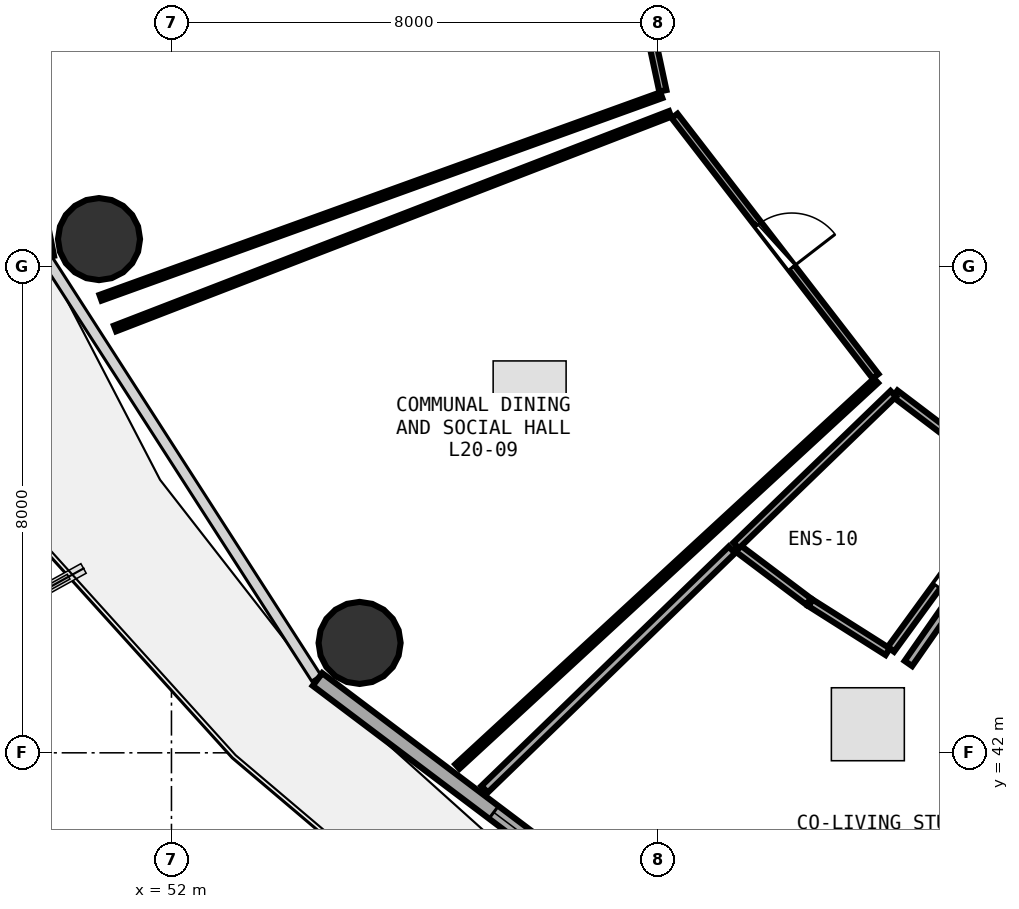
"""IFC4 building model, lengths in metres.
Left out: names, types, materials, properties, quantities, classifications, styles, units other than length and angle.
Written with IfcOpenShell. Run it as: python <this file> out.ifc"""

import sys

from ifc_helpers import new_model, si_unit, direction, frame, frame_2d, origin, origin_2d, place, context, subcontext, project, spatial, rectangle, circle, extrude, element, fill, save


model = new_model("IFC4")
c1 = context("Model", 3, precision=1e-05, world=origin(), true_north=direction((0.0, 1.0)))
c2 = subcontext(c1, "Body", "Model", "MODEL_VIEW")
j1 = project(units=[si_unit("LENGTHUNIT", "METRE"), si_unit("PLANEANGLEUNIT", "RADIAN")], contexts=[c1])
p1 = place(None, origin())
s1 = spatial("IfcSite", under=j1, at=p1, CompositionType="ELEMENT")
p2 = place(p1, origin())
s2 = spatial("IfcBuilding", under=s1, at=p2, CompositionType="ELEMENT")
p3 = place(p2, frame((0.0, 0.0, 80.1)))
s3 = spatial("IfcBuildingStorey", under=s2, at=p3, CompositionType="ELEMENT", Elevation=80.1)
for number, where, z_axis, x_axis in (
    (1, (50.808, 50.448, 0.0), (0.0, 0.0, 1.0), (1.0, 0.0, 0.0)),
    (2, (55.094, 43.807, 0.0), (0.0, 0.0, 1.0), (1.0, 0.0, 0.0)),
):
    element("IfcColumn", number, at=place(p3, frame(where, z_axis=z_axis, x_axis=x_axis)), inside=s3, PredefinedType="COLUMN", context=c2, shape_type="SweptSolid", body=[
        extrude(circle(Radius=0.675, at=origin_2d()), origin(), (0.0, 0.0, 1.0), 3.75),
    ])
p4 = place(p3, frame((48.403, 57.985, 0.0), z_axis=(0.0, 0.0, 1.0), x_axis=(0.192581843632, -0.981280914674, 0.0)))
e3 = element("IfcWall", 3, at=p4, inside=s3, PredefinedType="SOLIDWALL", context=c2, shape_type="SweptSolid", body=[
    extrude(rectangle(XDim=7.987, YDim=0.26, at=frame_2d((3.993, 0.0))), origin(), (0.0, 0.0, 1.0), 3.475),
])
p5 = place(p4, frame((3.193, 0.0, 0.85)))
e4 = element("IfcOpeningElement", 4, at=p5, cuts=e3, PredefinedType="OPENING", context=c2, shape_type="SweptSolid", body=[
    extrude(rectangle(XDim=1.6, YDim=1.45, at=frame_2d((0.8, 0.725))), frame((0.0, 0.14, 0.0), z_axis=(0.0, -1.0, 0.0), x_axis=(1.0, 0.0, 0.0)), (0.0, 0.0, 1.0), 0.28),
])
p6 = place(p3, frame((54.401, 43.207, 0.0), z_axis=(0.0, 0.0, 1.0), x_axis=(0.798501507879, -0.601992808857, 0.0)))
e5 = element("IfcWall", 5, at=p6, inside=s3, PredefinedType="SOLIDWALL", context=c2, shape_type="SweptSolid", body=[
    extrude(rectangle(XDim=8.499, YDim=0.26, at=frame_2d((4.25, 0.0))), origin(), (0.0, 0.0, 1.0), 3.475),
])
p7 = place(p6, frame((3.63, 0.0, 0.85)))
e6 = element("IfcOpeningElement", 6, at=p7, cuts=e5, PredefinedType="OPENING", context=c2, shape_type="SweptSolid", body=[
    extrude(rectangle(XDim=1.6, YDim=1.45, at=frame_2d((0.8, 0.725))), frame((0.0, 0.14, 0.0), z_axis=(0.0, -1.0, 0.0), x_axis=(1.0, 0.0, 0.0)), (0.0, 0.0, 1.0), 0.28),
])
p8 = place(p3, frame((58.983, 58.012, 0.0), z_axis=(0.0, 0.0, 1.0), x_axis=(0.209586341226, -0.977790143933, 0.0)))
e7 = element("IfcWall", 7, at=p8, inside=s3, PredefinedType="PARTITIONING", context=c2, shape_type="SweptSolid", body=[
    extrude(rectangle(XDim=5.242, YDim=0.12, at=frame_2d((2.621, 0.0))), origin(), (0.0, 0.0, 1.0), 2.925),
])
p9 = place(p8, frame((2.171, 0.0, 0.0)))
e8 = element("IfcOpeningElement", 8, at=p9, cuts=e7, PredefinedType="OPENING", context=c2, shape_type="SweptSolid", body=[
    extrude(rectangle(XDim=0.9, YDim=2.08, at=frame_2d((0.45, 1.04))), frame((0.0, 0.07, 0.0), z_axis=(0.0, -1.0, 0.0), x_axis=(1.0, 0.0, 0.0)), (0.0, 0.0, 1.0), 0.14),
])
p10 = place(p3, frame((60.275, 52.473, 0.0), z_axis=(0.0, 0.0, 1.0), x_axis=(0.611167326409, -0.791501420801, 0.0)))
e9 = element("IfcWall", 9, at=p10, inside=s3, PredefinedType="PARTITIONING", context=c2, shape_type="SweptSolid", body=[
    extrude(rectangle(XDim=5.407, YDim=0.12, at=frame_2d((2.704, 0.0))), origin(), (0.0, 0.0, 1.0), 2.925),
])
p11 = place(p10, frame((2.254, 0.0, 0.0)))
e10 = element("IfcOpeningElement", 10, at=p11, cuts=e9, PredefinedType="OPENING", context=c2, shape_type="SweptSolid", body=[
    extrude(rectangle(XDim=0.9, YDim=2.08, at=frame_2d((0.45, 1.04))), frame((0.0, 0.07, 0.0), z_axis=(0.0, -1.0, 0.0), x_axis=(1.0, 0.0, 0.0)), (0.0, 0.0, 1.0), 0.14),
])
p12 = place(p3, frame((65.855, 46.477, 0.0), z_axis=(0.0, 0.0, 1.0), x_axis=(-0.589016516568, -0.808120995402, 0.0)))
e11 = element("IfcWall", 11, at=p12, inside=s3, PredefinedType="PLUMBINGWALL", context=c2, shape_type="SweptSolid", body=[
    extrude(rectangle(XDim=3.435, YDim=0.13, at=frame_2d((1.718, 0.0))), origin(), (0.0, 0.0, 1.0), 3.175),
])
p13 = place(p12, frame((1.288, 0.0, 0.0)))
e12 = element("IfcOpeningElement", 12, at=p13, cuts=e11, PredefinedType="OPENING", context=c2, shape_type="SweptSolid", body=[
    extrude(rectangle(XDim=0.86, YDim=2.05, at=frame_2d((0.43, 1.025))), frame((0.0, 0.075, 0.0), z_axis=(0.0, -1.0, 0.0), x_axis=(1.0, 0.0, 0.0)), (0.0, 0.0, 1.0), 0.15),
])
p14 = place(p3, frame((60.056, 52.814, 0.0), z_axis=(0.0, 0.0, 1.0), x_axis=(-0.940543515483, -0.339673218671, 0.0)))
e13 = element("IfcWall", 13, at=p14, inside=s3, PredefinedType="PARTITIONING", context=c2, shape_type="SweptSolid", body=[
    extrude(rectangle(XDim=9.806, YDim=0.1, at=frame_2d((4.903, 0.0))), origin(), (0.0, 0.0, 1.0), 2.925),
])
p15 = place(p3, frame((63.587, 48.119, 0.0), z_axis=(0.0, 0.0, 1.0), x_axis=(-0.735387084409, -0.677647279995, 0.0)))
e14 = element("IfcWall", 14, at=p15, inside=s3, PredefinedType="PARTITIONING", context=c2, shape_type="SweptSolid", body=[
    extrude(rectangle(XDim=9.361, YDim=0.1, at=frame_2d((4.681, 0.0))), origin(), (0.0, 0.0, 1.0), 2.975),
])
p16 = place(p3, frame((51.072, 48.979, 0.0), z_axis=(0.0, 0.0, 1.0), x_axis=(0.932757339165, 0.360504849112, 0.0)))
e15 = element("IfcWall", 15, at=p16, inside=s3, PredefinedType="PARTITIONING", context=c2, shape_type="SweptSolid", body=[
    extrude(rectangle(XDim=9.786, YDim=0.1, at=frame_2d((4.893, 0.0))), origin(), (0.0, 0.0, 1.0), 2.925),
])
p17 = place(p3, frame((63.901, 47.907, 0.0), z_axis=(0.0, 0.0, 1.0), x_axis=(0.796629313308, -0.604468144056, 0.0)))
e16 = element("IfcWall", 16, at=p17, inside=s3, PredefinedType="PLUMBINGWALL", context=c2, shape_type="SweptSolid", body=[
    extrude(rectangle(XDim=1.178, YDim=0.13, at=frame_2d((0.589, 0.0))), origin(), (0.0, 0.0, 1.0), 2.925),
])
p18 = place(p3, frame((63.779, 43.663, 0.0), z_axis=(0.0, 0.0, 1.0), x_axis=(-0.844931806669, 0.53487404319, 0.0)))
e17 = element("IfcWall", 17, at=p18, inside=s3, PredefinedType="PLUMBINGWALL", context=c2, shape_type="SweptSolid", body=[
    extrude(rectangle(XDim=1.501, YDim=0.13, at=frame_2d((0.75, 0.0))), origin(), (0.0, 0.0, 1.0), 2.925),
])
p19 = place(p3, frame((62.478, 44.488, 0.0), z_axis=(0.0, 0.0, 1.0), x_axis=(-0.798935684124, 0.601416471868, 0.0)))
e18 = element("IfcWall", 18, at=p19, inside=s3, PredefinedType="PLUMBINGWALL", context=c2, shape_type="SweptSolid", body=[
    extrude(rectangle(XDim=1.488, YDim=0.13, at=frame_2d((0.744, 0.0))), origin(), (0.0, 0.0, 1.0), 3.175),
])
p20 = place(p3, frame((61.287, 45.409, 0.0), z_axis=(0.0, 0.0, 1.0), x_axis=(0.719134400332, 0.694871005481, 0.0)))
e19 = element("IfcWall", 19, at=p20, inside=s3, PredefinedType="PLUMBINGWALL", context=c2, shape_type="SweptSolid", body=[
    extrude(rectangle(XDim=3.592, YDim=0.13, at=frame_2d((1.796, 0.0))), origin(), (0.0, 0.0, 1.0), 3.175),
])
p21 = place(p3, frame((57.15, 41.401, 0.0), z_axis=(0.0, 0.0, 1.0), x_axis=(0.718527749954, 0.695498290829, 0.0)))
e20 = element("IfcWall", 20, at=p21, inside=s3, PredefinedType="PARTITIONING", context=c2, shape_type="SweptSolid", body=[
    extrude(rectangle(XDim=5.661, YDim=0.15, at=frame_2d((2.831, 0.0))), origin(), (0.0, 0.0, 1.0), 2.975),
])
p22 = place(p3, frame((64.12, 43.469, 0.0), z_axis=(0.0, 0.0, 1.0), x_axis=(0.571339432424, 0.820713867897, 0.0)))
e21 = element("IfcWall", 21, at=p22, inside=s3, PredefinedType="PARTITIONING", context=c2, shape_type="SweptSolid", body=[
    extrude(rectangle(XDim=1.275, YDim=0.15, at=frame_2d((0.637, 0.0))), origin(), (0.0, 0.0, 1.0), 3.175),
])
p23 = place(p7, origin())
e22 = element("IfcWindow", 22, at=p23, inside=s3, PartitioningType="SINGLE_PANEL", PredefinedType="WINDOW", context=c2, shape_type="SweptSolid", body=[
    extrude(rectangle(XDim=1.6, YDim=1.45, at=frame_2d((0.8, 0.725))), frame((0.0, 0.03, 0.0), z_axis=(0.0, -1.0, 0.0), x_axis=(1.0, 0.0, 0.0)), (0.0, 0.0, 1.0), 0.06),
])
fill(e6, e22)
p24 = place(p11, origin())
e23 = element("IfcDoor", 23, at=p24, inside=s3, OperationType="SINGLE_SWING_RIGHT", PredefinedType="DOOR", context=c2, shape_type="SweptSolid", body=[
    extrude(rectangle(XDim=0.9, YDim=2.08, at=frame_2d((0.45, 1.04))), frame((0.0, 0.025, 0.0), z_axis=(0.0, -1.0, 0.0), x_axis=(1.0, 0.0, 0.0)), (0.0, 0.0, 1.0), 0.05),
])
fill(e10, e23)
p25 = place(p13, origin())
e24 = element("IfcDoor", 24, at=p25, inside=s3, OperationType="SINGLE_SWING_LEFT", PredefinedType="DOOR", context=c2, shape_type="SweptSolid", body=[
    extrude(rectangle(XDim=0.86, YDim=2.05, at=frame_2d((0.43, 1.025))), frame((0.0, 0.025, 0.0), z_axis=(0.0, -1.0, 0.0), x_axis=(1.0, 0.0, 0.0)), (0.0, 0.0, 1.0), 0.05),
])
fill(e12, e24)
save(model, sys.argv[1])
